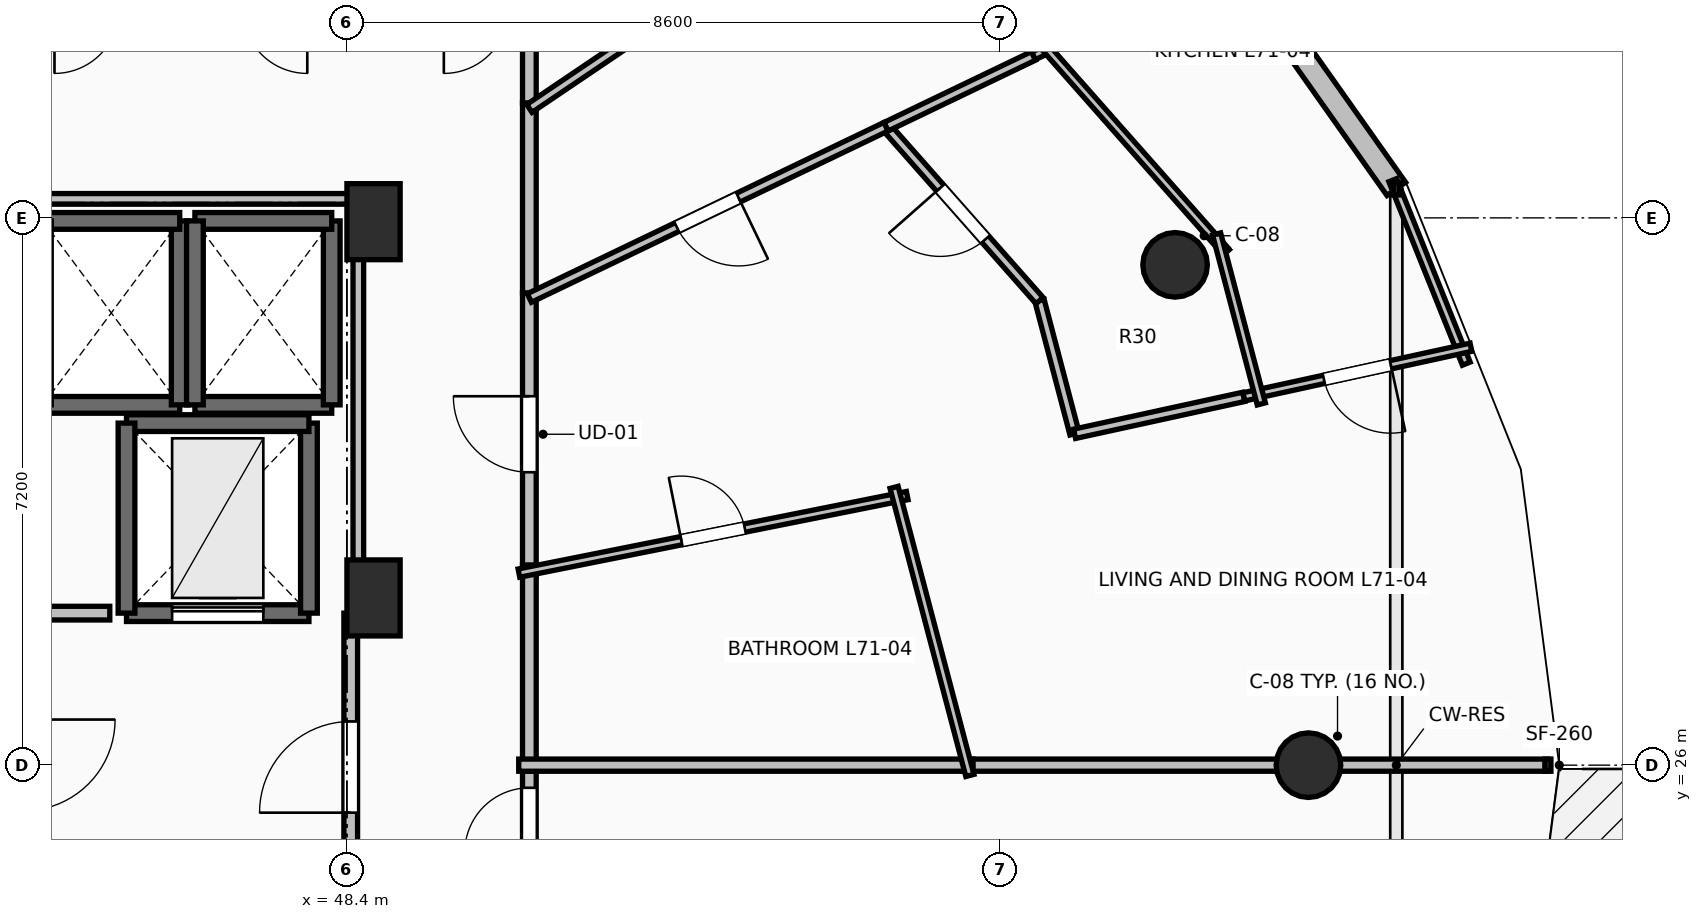
"""IFC4 building model, lengths in metres.
Left out: names, types, materials, properties, quantities, classifications, styles, units other than length and angle.
Written with IfcOpenShell. Run it as: python <this file> out.ifc"""

import sys

from ifc_helpers import new_model, si_unit, direction, frame, frame_2d, origin, origin_2d, place, context, subcontext, project, spatial, rectangle, circle, extrude, element, fill, save


model = new_model("IFC4")
c1 = context("Model", 3, precision=1e-05, world=origin(), true_north=direction((0.0, 1.0)))
c2 = subcontext(c1, "Body", "Model", "MODEL_VIEW")
j1 = project(units=[si_unit("LENGTHUNIT", "METRE"), si_unit("PLANEANGLEUNIT", "RADIAN")], contexts=[c1])
p1 = place(None, origin())
s1 = spatial("IfcSite", under=j1, at=p1, CompositionType="ELEMENT")
p2 = place(p1, origin())
s2 = spatial("IfcBuilding", under=s1, at=p2, CompositionType="ELEMENT")
p3 = place(p2, frame((0.0, 0.0, 262.65)))
s3 = spatial("IfcBuildingStorey", under=s2, at=p3, CompositionType="ELEMENT", Elevation=262.65)
for number, where, z_axis, x_axis in (
    (1, (61.05, 26.0, 0.0), (0.0, 0.0, 1.0), (1.0, 0.0, 0.0)),
    (2, (59.295, 32.582, 0.0), (0.0, 0.0, 1.0), (0.924, 0.383, 0.0)),
):
    element("IfcColumn", number, at=place(p3, frame(where, z_axis=z_axis, x_axis=x_axis)), inside=s3, PredefinedType="COLUMN", context=c2, shape_type="SweptSolid", body=[
        extrude(circle(Radius=0.425, at=origin_2d()), origin(), (0.0, 0.0, 1.0), 3.55),
    ])
for number, where, z_axis, x_axis in (
    (3, (48.75, 33.15, 0.0), (0.0, 0.0, 1.0), (1.0, 0.0, 0.0)),
    (4, (48.75, 28.2, 0.0), (0.0, 0.0, 1.0), (1.0, 0.0, 0.0)),
):
    element("IfcColumn", number, at=place(p3, frame(where, z_axis=z_axis, x_axis=x_axis)), inside=s3, PredefinedType="PILASTER", context=c2, shape_type="SweptSolid", body=[
        extrude(rectangle(XDim=0.7, YDim=1.0, at=origin_2d()), origin(), (0.0, 0.0, 1.0), 3.55),
    ])
p4 = place(p3, frame((62.206, 33.581, 0.0), z_axis=(0.0, 0.0, 1.0), x_axis=(-0.577261247247, 0.816559521668, 0.0)))
e5 = element("IfcWall", 5, at=p4, inside=s3, PredefinedType="STANDARD", context=c2, shape_type="SweptSolid", body=[
    extrude(rectangle(XDim=4.194, YDim=0.3, at=frame_2d((2.097, 0.0))), origin(), (0.0, 0.0, 1.0), 3.29),
])
p5 = place(p3, frame((44.4, 30.74, 0.0), z_axis=(0.0, 0.0, 1.0), x_axis=(1.0, 0.0, 0.0)))
e6 = element("IfcWall", 6, at=p5, inside=s3, PredefinedType="SOLIDWALL", context=c2, shape_type="SweptSolid", body=[
    extrude(rectangle(XDim=1.8, YDim=0.22, at=frame_2d((0.9, 0.0))), origin(), (0.0, 0.0, 1.0), 3.29),
])
p6 = place(p3, frame((46.2, 30.74, 0.0), z_axis=(0.0, 0.0, 1.0), x_axis=(0.0, 1.0, 0.0)))
e7 = element("IfcWall", 7, at=p6, inside=s3, PredefinedType="SOLIDWALL", context=c2, shape_type="SweptSolid", body=[
    extrude(rectangle(XDim=2.42, YDim=0.22, at=frame_2d((1.21, 0.0))), origin(), (0.0, 0.0, 1.0), 3.29),
])
for number, where, z_axis, x_axis in (
    (8, (46.2, 33.16, 0.0), (0.0, 0.0, 1.0), (-1.0, 0.0, 0.0)),
    (9, (46.4, 30.74, 0.0), (0.0, 0.0, 1.0), (1.0, 0.0, 0.0)),
):
    element("IfcWall", number, at=place(p3, frame(where, z_axis=z_axis, x_axis=x_axis)), inside=s3, PredefinedType="SOLIDWALL", context=c2, shape_type="SweptSolid", body=[
        extrude(rectangle(XDim=1.8, YDim=0.22, at=frame_2d((0.9, 0.0))), origin(), (0.0, 0.0, 1.0), 3.29),
    ])
p7 = place(p3, frame((48.2, 30.74, 0.0), z_axis=(0.0, 0.0, 1.0), x_axis=(0.0, 1.0, 0.0)))
e10 = element("IfcWall", 10, at=p7, inside=s3, PredefinedType="SOLIDWALL", context=c2, shape_type="SweptSolid", body=[
    extrude(rectangle(XDim=2.42, YDim=0.22, at=frame_2d((1.21, 0.0))), origin(), (0.0, 0.0, 1.0), 3.29),
])
p8 = place(p3, frame((48.2, 33.16, 0.0), z_axis=(0.0, 0.0, 1.0), x_axis=(-1.0, 0.0, 0.0)))
e11 = element("IfcWall", 11, at=p8, inside=s3, PredefinedType="SOLIDWALL", context=c2, shape_type="SweptSolid", body=[
    extrude(rectangle(XDim=1.8, YDim=0.22, at=frame_2d((0.9, 0.0))), origin(), (0.0, 0.0, 1.0), 3.29),
])
p9 = place(p3, frame((46.4, 33.16, 0.0), z_axis=(0.0, 0.0, 1.0), x_axis=(0.0, -1.0, 0.0)))
e12 = element("IfcWall", 12, at=p9, inside=s3, PredefinedType="SOLIDWALL", context=c2, shape_type="SweptSolid", body=[
    extrude(rectangle(XDim=2.42, YDim=0.22, at=frame_2d((1.21, 0.0))), origin(), (0.0, 0.0, 1.0), 3.29),
])
p10 = place(p3, frame((45.5, 28.0, 0.0), z_axis=(0.0, 0.0, 1.0), x_axis=(1.0, 0.0, 0.0)))
e13 = element("IfcWall", 13, at=p10, inside=s3, PredefinedType="SHEAR", context=c2, shape_type="SweptSolid", body=[
    extrude(rectangle(XDim=2.4, YDim=0.22, at=frame_2d((1.2, 0.0))), origin(), (0.0, 0.0, 1.0), 3.29),
])
p11 = place(p10, frame((0.6, 0.0, 0.0)))
e14 = element("IfcOpeningElement", 14, at=p11, cuts=e13, PredefinedType="OPENING", context=c2, shape_type="SweptSolid", body=[
    extrude(rectangle(XDim=1.2, YDim=2.2, at=frame_2d((0.6, 1.1))), frame((0.0, 0.125, 0.0), z_axis=(0.0, -1.0, 0.0), x_axis=(1.0, 0.0, 0.0)), (0.0, 0.0, 1.0), 0.25),
])
p12 = place(p3, frame((47.9, 28.0, 0.0), z_axis=(0.0, 0.0, 1.0), x_axis=(0.0, 1.0, 0.0)))
e15 = element("IfcWall", 15, at=p12, inside=s3, PredefinedType="SHEAR", context=c2, shape_type="SweptSolid", body=[
    extrude(rectangle(XDim=2.5, YDim=0.22, at=frame_2d((1.25, 0.0))), origin(), (0.0, 0.0, 1.0), 3.29),
])
p13 = place(p3, frame((47.9, 30.5, 0.0), z_axis=(0.0, 0.0, 1.0), x_axis=(-1.0, 0.0, 0.0)))
e16 = element("IfcWall", 16, at=p13, inside=s3, PredefinedType="SHEAR", context=c2, shape_type="SweptSolid", body=[
    extrude(rectangle(XDim=2.4, YDim=0.22, at=frame_2d((1.2, 0.0))), origin(), (0.0, 0.0, 1.0), 3.29),
])
p14 = place(p3, frame((45.5, 30.5, 0.0), z_axis=(0.0, 0.0, 1.0), x_axis=(0.0, -1.0, 0.0)))
e17 = element("IfcWall", 17, at=p14, inside=s3, PredefinedType="SHEAR", context=c2, shape_type="SweptSolid", body=[
    extrude(rectangle(XDim=2.5, YDim=0.22, at=frame_2d((1.25, 0.0))), origin(), (0.0, 0.0, 1.0), 3.29),
])
p15 = place(p3, frame((48.45, 23.95, 0.0), z_axis=(0.0, 0.0, 1.0), x_axis=(0.0, 1.0, 0.0)))
e18 = element("IfcWall", 18, at=p15, inside=s3, PredefinedType="PARTITIONING", context=c2, shape_type="SweptSolid", body=[
    extrude(rectangle(XDim=4.05, YDim=0.18, at=frame_2d((2.025, 0.0))), origin(), (0.0, 0.0, 1.0), 3.29),
])
p16 = place(p15, frame((1.425, 0.0, 0.0)))
e19 = element("IfcOpeningElement", 19, at=p16, cuts=e18, PredefinedType="OPENING", context=c2, shape_type="SweptSolid", body=[
    extrude(rectangle(XDim=1.2, YDim=2.15, at=frame_2d((0.6, 1.075))), frame((0.0, 0.105, 0.0), z_axis=(0.0, -1.0, 0.0), x_axis=(1.0, 0.0, 0.0)), (0.0, 0.0, 1.0), 0.21),
])
p17 = place(p3, frame((50.8, 24.494, 0.0), z_axis=(0.0, 0.0, 1.0), x_axis=(0.0, 1.0, 0.0)))
e20 = element("IfcWall", 20, at=p17, inside=s3, PredefinedType="PARTITIONING", context=c2, shape_type="SweptSolid", body=[
    extrude(rectangle(XDim=1.566, YDim=0.18, at=frame_2d((0.783, 0.0))), origin(), (0.0, 0.0, 1.0), 3.29),
])
p18 = place(p17, frame((0.358, 0.0, 0.0)))
e21 = element("IfcOpeningElement", 21, at=p18, cuts=e20, PredefinedType="OPENING", context=c2, shape_type="SweptSolid", body=[
    extrude(rectangle(XDim=0.85, YDim=2.1, at=frame_2d((0.425, 1.05))), frame((0.0, 0.105, 0.0), z_axis=(0.0, -1.0, 0.0), x_axis=(1.0, 0.0, 0.0)), (0.0, 0.0, 1.0), 0.21),
])
p19 = place(p3, frame((50.8, 28.494, 0.0), z_axis=(0.0, 0.0, 1.0), x_axis=(0.0, 1.0, 0.0)))
e22 = element("IfcWall", 22, at=p19, inside=s3, PredefinedType="PARTITIONING", context=c2, shape_type="SweptSolid", body=[
    extrude(rectangle(XDim=3.719, YDim=0.18, at=frame_2d((1.859, 0.0))), origin(), (0.0, 0.0, 1.0), 3.29),
])
p20 = place(p19, frame((1.36, 0.0, 0.0)))
e23 = element("IfcOpeningElement", 23, at=p20, cuts=e22, PredefinedType="OPENING", context=c2, shape_type="SweptSolid", body=[
    extrude(rectangle(XDim=1.0, YDim=2.15, at=frame_2d((0.5, 1.075))), frame((0.0, 0.105, 0.0), z_axis=(0.0, -1.0, 0.0), x_axis=(1.0, 0.0, 0.0)), (0.0, 0.0, 1.0), 0.21),
])
p21 = place(p3, frame((50.8, 25.92, 0.0), z_axis=(0.0, 0.0, 1.0), x_axis=(0.0, 1.0, 0.0)))
e24 = element("IfcWall", 24, at=p21, inside=s3, PredefinedType="PARTITIONING", context=c2, shape_type="SweptSolid", body=[
    extrude(rectangle(XDim=2.714, YDim=0.18, at=frame_2d((1.357, 0.0))), origin(), (0.0, 0.0, 1.0), 2.482),
])
p22 = place(p3, frame((50.8, 32.213, 0.0), z_axis=(0.0, 0.0, 1.0), x_axis=(0.0, 1.0, 0.0)))
e25 = element("IfcWall", 25, at=p22, inside=s3, PredefinedType="PARTITIONING", context=c2, shape_type="SweptSolid", body=[
    extrude(rectangle(XDim=2.499, YDim=0.18, at=frame_2d((1.25, 0.0))), origin(), (0.0, 0.0, 1.0), 2.482),
])
p23 = place(p3, frame((50.8, 34.712, 0.0), z_axis=(0.0, 0.0, 1.0), x_axis=(0.0, 1.0, 0.0)))
e26 = element("IfcWall", 26, at=p23, inside=s3, PredefinedType="PARTITIONING", context=c2, shape_type="SweptSolid", body=[
    extrude(rectangle(XDim=1.238, YDim=0.18, at=frame_2d((0.619, 0.0))), origin(), (0.0, 0.0, 1.0), 2.482),
])
p24 = place(p3, frame((64.199, 26.0, 0.0), z_axis=(0.0, 0.0, 1.0), x_axis=(-1.0, 0.0, 0.0)))
e27 = element("IfcWall", 27, at=p24, inside=s3, PredefinedType="PARTITIONING", context=c2, shape_type="SweptSolid", body=[
    extrude(rectangle(XDim=7.701, YDim=0.16, at=frame_2d((3.851, 0.0))), origin(), (0.0, 0.0, 1.0), 2.482),
])
p25 = place(p3, frame((56.638, 26.0, 0.0), z_axis=(0.0, 0.0, 1.0), x_axis=(-1.0, 0.0, 0.0)))
e28 = element("IfcWall", 28, at=p25, inside=s3, PredefinedType="PARTITIONING", context=c2, shape_type="SweptSolid", body=[
    extrude(rectangle(XDim=5.978, YDim=0.16, at=frame_2d((2.989, 0.0))), origin(), (0.0, 0.0, 1.0), 2.482),
])
p26 = place(p3, frame((50.663, 28.527, 0.0), z_axis=(0.0, 0.0, 1.0), x_axis=(0.980652709614, 0.195755620935, 0.0)))
e29 = element("IfcWall", 29, at=p26, inside=s3, PredefinedType="PARTITIONING", context=c2, shape_type="SweptSolid", body=[
    extrude(rectangle(XDim=5.209, YDim=0.11, at=frame_2d((2.605, 0.0))), origin(), (0.0, 0.0, 1.0), 2.936),
])
p27 = place(p26, frame((2.18, 0.0, 0.0)))
e30 = element("IfcOpeningElement", 30, at=p27, cuts=e29, PredefinedType="OPENING", context=c2, shape_type="SweptSolid", body=[
    extrude(rectangle(XDim=0.85, YDim=2.1, at=frame_2d((0.425, 1.05))), frame((0.0, 0.07, 0.0), z_axis=(0.0, -1.0, 0.0), x_axis=(1.0, 0.0, 0.0)), (0.0, 0.0, 1.0), 0.14),
])
p28 = place(p3, frame((55.598, 29.654, 0.0), z_axis=(0.0, 0.0, 1.0), x_axis=(0.25449329928, -0.967074537263, 0.0)))
e31 = element("IfcWall", 31, at=p28, inside=s3, PredefinedType="PARTITIONING", context=c2, shape_type="SweptSolid", body=[
    extrude(rectangle(XDim=3.919, YDim=0.11, at=frame_2d((1.959, 0.0))), origin(), (0.0, 0.0, 1.0), 2.482),
])
p29 = place(p3, frame((57.432, 35.33, 0.0), z_axis=(0.0, 0.0, 1.0), x_axis=(0.90133305384, 0.43312668592, 0.0)))
e32 = element("IfcWall", 32, at=p29, inside=s3, PredefinedType="PARTITIONING", context=c2, shape_type="SweptSolid", body=[
    extrude(rectangle(XDim=3.069, YDim=0.11, at=frame_2d((1.535, 0.0))), origin(), (0.0, 0.0, 1.0), 3.29),
])
p30 = place(p3, frame((63.126, 31.282, 0.0), z_axis=(0.0, 0.0, 1.0), x_axis=(-0.371940924939, 0.92825640227, 0.0)))
e33 = element("IfcWall", 33, at=p30, inside=s3, PredefinedType="PARTITIONING", context=c2, shape_type="SweptSolid", body=[
    extrude(rectangle(XDim=2.601, YDim=0.11, at=frame_2d((1.3, 0.0))), origin(), (0.0, 0.0, 1.0), 3.29),
])
p31 = place(p3, frame((63.188, 31.498, 0.0), z_axis=(0.0, 0.0, 1.0), x_axis=(-0.976993096252, -0.213270930688, 0.0)))
e34 = element("IfcWall", 34, at=p31, inside=s3, PredefinedType="PARTITIONING", context=c2, shape_type="SweptSolid", body=[
    extrude(rectangle(XDim=3.06, YDim=0.11, at=frame_2d((1.53, 0.0))), origin(), (0.0, 0.0, 1.0), 3.29),
])
p32 = place(p31, frame((1.08, 0.0, 0.0)))
e35 = element("IfcOpeningElement", 35, at=p32, cuts=e34, PredefinedType="OPENING", context=c2, shape_type="SweptSolid", body=[
    extrude(rectangle(XDim=0.9, YDim=2.1, at=frame_2d((0.45, 1.05))), frame((0.0, 0.07, 0.0), z_axis=(0.0, -1.0, 0.0), x_axis=(1.0, 0.0, 0.0)), (0.0, 0.0, 1.0), 0.14),
])
p33 = place(p3, frame((57.973, 30.359, 0.0), z_axis=(0.0, 0.0, 1.0), x_axis=(-0.254274526126, 0.967132082687, 0.0)))
e36 = element("IfcWall", 36, at=p33, inside=s3, PredefinedType="PARTITIONING", context=c2, shape_type="SweptSolid", body=[
    extrude(rectangle(XDim=1.813, YDim=0.125, at=frame_2d((0.906, 0.0))), origin(), (0.0, 0.0, 1.0), 3.29),
])
p34 = place(p3, frame((57.512, 32.112, 0.0), z_axis=(0.0, 0.0, 1.0), x_axis=(-0.662026430628, 0.749480490173, 0.0)))
e37 = element("IfcWall", 37, at=p34, inside=s3, PredefinedType="PARTITIONING", context=c2, shape_type="SweptSolid", body=[
    extrude(rectangle(XDim=3.051, YDim=0.125, at=frame_2d((1.526, 0.0))), origin(), (0.0, 0.0, 1.0), 2.482),
])
p35 = place(p34, frame((1.076, 0.0, 0.0)))
e38 = element("IfcOpeningElement", 38, at=p35, cuts=e37, PredefinedType="OPENING", context=c2, shape_type="SweptSolid", body=[
    extrude(rectangle(XDim=0.9, YDim=2.1, at=frame_2d((0.45, 1.05))), frame((0.0, 0.077, 0.0), z_axis=(0.0, -1.0, 0.0), x_axis=(1.0, 0.0, 0.0)), (0.0, 0.0, 1.0), 0.155),
])
p36 = place(p3, frame((55.492, 34.399, 0.0), z_axis=(0.0, 0.0, 1.0), x_axis=(0.901372521065, 0.433044545363, 0.0)))
e39 = element("IfcWall", 39, at=p36, inside=s3, PredefinedType="PARTITIONING", context=c2, shape_type="SweptSolid", body=[
    extrude(rectangle(XDim=2.152, YDim=0.125, at=frame_2d((1.076, 0.0))), origin(), (0.0, 0.0, 1.0), 2.874),
])
p37 = place(p3, frame((60.198, 30.845, 0.0), z_axis=(0.0, 0.0, 1.0), x_axis=(-0.976965000645, -0.213399595862, 0.0)))
e40 = element("IfcWall", 40, at=p37, inside=s3, PredefinedType="PARTITIONING", context=c2, shape_type="SweptSolid", body=[
    extrude(rectangle(XDim=2.278, YDim=0.125, at=frame_2d((1.139, 0.0))), origin(), (0.0, 0.0, 1.0), 2.874),
])
p38 = place(p3, frame((55.492, 34.399, 0.0), z_axis=(0.0, 0.0, 1.0), x_axis=(-0.901416162018, -0.432953695968, 0.0)))
e41 = element("IfcWall", 41, at=p38, inside=s3, PredefinedType="PARTITIONING", context=c2, shape_type="SweptSolid", body=[
    extrude(rectangle(XDim=5.205, YDim=0.125, at=frame_2d((2.603, 0.0))), origin(), (0.0, 0.0, 1.0), 2.482),
])
p39 = place(p38, frame((2.152, 0.0, 0.0)))
e42 = element("IfcOpeningElement", 42, at=p39, cuts=e41, PredefinedType="OPENING", context=c2, shape_type="SweptSolid", body=[
    extrude(rectangle(XDim=0.9, YDim=2.1, at=frame_2d((0.45, 1.05))), frame((0.0, 0.077, 0.0), z_axis=(0.0, -1.0, 0.0), x_axis=(1.0, 0.0, 0.0)), (0.0, 0.0, 1.0), 0.155),
])
p40 = place(p3, frame((57.519, 35.522, 0.0), z_axis=(0.0, 0.0, 1.0), x_axis=(0.662055665853, -0.749454665281, 0.0)))
e43 = element("IfcWall", 43, at=p40, inside=s3, PredefinedType="PARTITIONING", context=c2, shape_type="SweptSolid", body=[
    extrude(rectangle(XDim=3.701, YDim=0.11, at=frame_2d((1.851, 0.0))), origin(), (0.0, 0.0, 1.0), 3.29),
])
p41 = place(p3, frame((59.841, 32.988, 0.0), z_axis=(0.0, 0.0, 1.0), x_axis=(0.254519291204, -0.967067696909, 0.0)))
e44 = element("IfcWall", 44, at=p41, inside=s3, PredefinedType="PARTITIONING", context=c2, shape_type="SweptSolid", body=[
    extrude(rectangle(XDim=2.312, YDim=0.11, at=frame_2d((1.156, 0.0))), origin(), (0.0, 0.0, 1.0), 3.29),
])
p42 = place(p3, frame((57.466, 39.14, 0.0), z_axis=(0.0, 0.0, 1.0), x_axis=(-0.828823335801, -0.559510391352, 0.0)))
e45 = element("IfcWall", 45, at=p42, inside=s3, PredefinedType="PARTITIONING", context=c2, shape_type="SweptSolid", body=[
    extrude(rectangle(XDim=8.043, YDim=0.125, at=frame_2d((4.021, 0.0))), origin(), (0.0, 0.0, 1.0), 2.482),
])
p43 = place(p3, frame((45.28, 28.0, 0.0), z_axis=(0.0, 0.0, 1.0), x_axis=(-1.0, 0.0, 0.0)))
e46 = element("IfcWall", 46, at=p43, inside=s3, PredefinedType="PARTITIONING", context=c2, shape_type="SweptSolid", body=[
    extrude(rectangle(XDim=0.915, YDim=0.18, at=frame_2d((0.458, 0.0))), origin(), (0.0, 0.0, 1.0), 3.29),
])
p44 = place(p3, frame((48.55, 28.196, 0.0), z_axis=(0.0, 0.0, 1.0), x_axis=(0.0, 1.0, 0.0)))
e47 = element("IfcWall", 47, at=p44, inside=s3, PredefinedType="PARTITIONING", context=c2, shape_type="SweptSolid", body=[
    extrude(rectangle(XDim=5.254, YDim=0.14, at=frame_2d((2.627, 0.0))), origin(), (0.0, 0.0, 1.0), 2.482),
])
p45 = place(p3, frame((48.55, 33.45, 0.0), z_axis=(0.0, 0.0, 1.0), x_axis=(-1.0, 0.0, 0.0)))
e48 = element("IfcWall", 48, at=p45, inside=s3, PredefinedType="PARTITIONING", context=c2, shape_type="SweptSolid", body=[
    extrude(rectangle(XDim=4.21, YDim=0.14, at=frame_2d((2.105, 0.0))), origin(), (0.0, 0.0, 1.0), 2.482),
])
p46 = place(p11, origin())
e49 = element("IfcDoor", 49, at=p46, inside=s3, OperationType="SLIDING_TO_LEFT", PredefinedType="DOOR", context=c2, shape_type="SweptSolid", body=[
    extrude(rectangle(XDim=1.2, YDim=2.2, at=frame_2d((0.6, 1.1))), frame((0.0, 0.025, 0.0), z_axis=(0.0, -1.0, 0.0), x_axis=(1.0, 0.0, 0.0)), (0.0, 0.0, 1.0), 0.05),
])
fill(e14, e49)
p47 = place(p16, origin())
e50 = element("IfcDoor", 50, at=p47, inside=s3, OperationType="SINGLE_SWING_LEFT", PredefinedType="DOOR", context=c2, shape_type="SweptSolid", body=[
    extrude(rectangle(XDim=1.2, YDim=2.15, at=frame_2d((0.6, 1.075))), frame((0.0, 0.025, 0.0), z_axis=(0.0, -1.0, 0.0), x_axis=(1.0, 0.0, 0.0)), (0.0, 0.0, 1.0), 0.05),
])
fill(e19, e50)
p48 = place(p20, origin())
e51 = element("IfcDoor", 51, at=p48, inside=s3, OperationType="SINGLE_SWING_RIGHT", PredefinedType="DOOR", context=c2, shape_type="SweptSolid", body=[
    extrude(rectangle(XDim=1.0, YDim=2.15, at=frame_2d((0.5, 1.075))), frame((0.0, 0.025, 0.0), z_axis=(0.0, -1.0, 0.0), x_axis=(1.0, 0.0, 0.0)), (0.0, 0.0, 1.0), 0.05),
])
fill(e23, e51)
p49 = place(p27, origin())
e52 = element("IfcDoor", 52, at=p49, inside=s3, OperationType="SINGLE_SWING_LEFT", PredefinedType="DOOR", context=c2, shape_type="SweptSolid", body=[
    extrude(rectangle(XDim=0.85, YDim=2.1, at=frame_2d((0.425, 1.05))), frame((0.0, 0.025, 0.0), z_axis=(0.0, -1.0, 0.0), x_axis=(1.0, 0.0, 0.0)), (0.0, 0.0, 1.0), 0.05),
])
fill(e30, e52)
p50 = place(p32, origin())
e53 = element("IfcDoor", 53, at=p50, inside=s3, OperationType="SINGLE_SWING_LEFT", PredefinedType="DOOR", context=c2, shape_type="SweptSolid", body=[
    extrude(rectangle(XDim=0.9, YDim=2.1, at=frame_2d((0.45, 1.05))), frame((0.0, 0.025, 0.0), z_axis=(0.0, -1.0, 0.0), x_axis=(1.0, 0.0, 0.0)), (0.0, 0.0, 1.0), 0.05),
])
fill(e35, e53)
p51 = place(p35, origin())
e54 = element("IfcDoor", 54, at=p51, inside=s3, OperationType="SINGLE_SWING_RIGHT", PredefinedType="DOOR", context=c2, shape_type="SweptSolid", body=[
    extrude(rectangle(XDim=0.9, YDim=2.1, at=frame_2d((0.45, 1.05))), frame((0.0, 0.025, 0.0), z_axis=(0.0, -1.0, 0.0), x_axis=(1.0, 0.0, 0.0)), (0.0, 0.0, 1.0), 0.05),
])
fill(e38, e54)
p52 = place(p39, origin())
e55 = element("IfcDoor", 55, at=p52, inside=s3, OperationType="SINGLE_SWING_LEFT", PredefinedType="DOOR", context=c2, shape_type="SweptSolid", body=[
    extrude(rectangle(XDim=0.9, YDim=2.1, at=frame_2d((0.45, 1.05))), frame((0.0, 0.025, 0.0), z_axis=(0.0, -1.0, 0.0), x_axis=(1.0, 0.0, 0.0)), (0.0, 0.0, 1.0), 0.05),
])
fill(e42, e55)
p53 = place(p18, origin())
e56 = element("IfcDoor", 56, at=p53, inside=s3, OperationType="SINGLE_SWING_LEFT", PredefinedType="DOOR", context=c2, shape_type="SweptSolid", body=[
    extrude(rectangle(XDim=0.85, YDim=2.1, at=frame_2d((0.425, 1.05))), frame((0.0, 0.025, 0.0), z_axis=(0.0, -1.0, 0.0), x_axis=(1.0, 0.0, 0.0)), (0.0, 0.0, 1.0), 0.05),
])
fill(e21, e56)
save(model, sys.argv[1])
